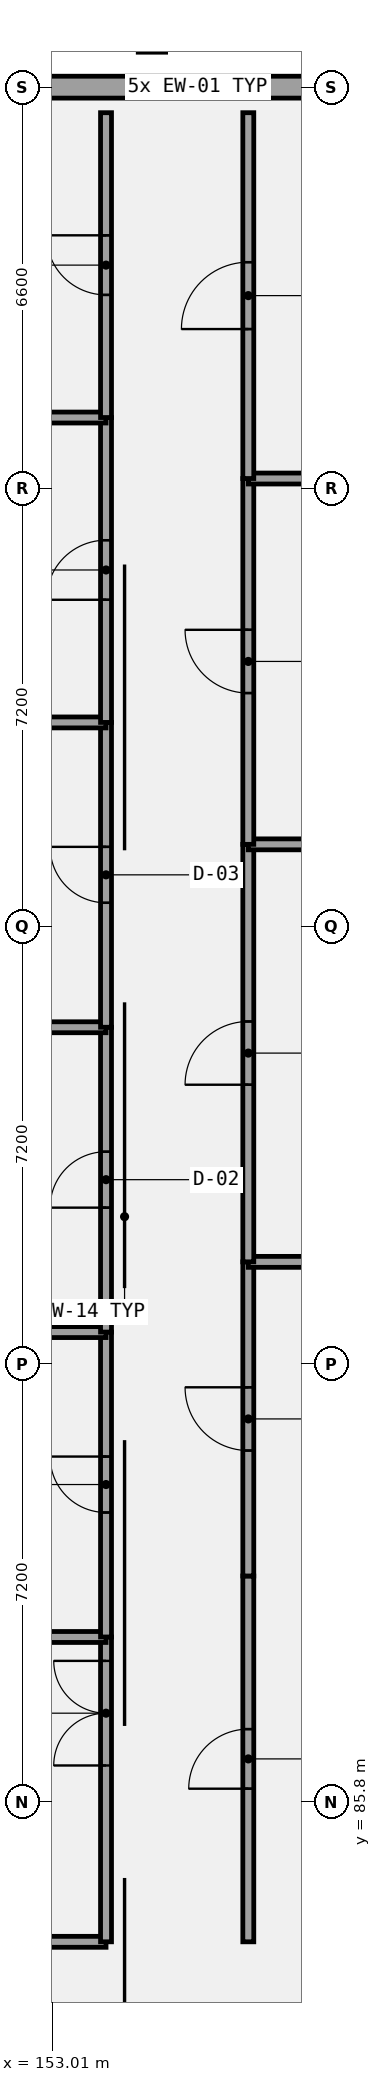
"""IFC4 building model, lengths in metres.
Left out: names, types, materials, properties, quantities, classifications, styles, units other than length and angle.
Written with IfcOpenShell. Run it as: python <this file> out.ifc"""

import sys

from ifc_helpers import new_model, si_unit, direction, frame, frame_2d, origin, origin_2d, place, context, subcontext, project, spatial, rectangle, extrude, element, fill, save


model = new_model("IFC4")
c1 = context("Model", 3, precision=1e-05, world=origin(), true_north=direction((0.0, 1.0)))
c2 = subcontext(c1, "Body", "Model", "MODEL_VIEW")
j1 = project(units=[si_unit("LENGTHUNIT", "METRE"), si_unit("PLANEANGLEUNIT", "RADIAN")], contexts=[c1])
p1 = place(None, origin())
s1 = spatial("IfcSite", under=j1, at=p1, CompositionType="ELEMENT")
p2 = place(p1, origin())
s2 = spatial("IfcBuilding", under=s1, at=p2, CompositionType="ELEMENT")
p3 = place(p2, origin())
s3 = spatial("IfcBuildingStorey", under=s2, at=p3, CompositionType="ELEMENT", Elevation=0.0)
p4 = place(p3, frame((154.65, 114.95, -0.32), z_axis=(0.0, 0.0, 1.0), x_axis=(1.0, 0.0, 0.0)))
e1 = element("IfcColumn", 1, at=p4, inside=s3, PredefinedType="PILASTER", context=c2, shape_type="SweptSolid", body=[
    extrude(rectangle(XDim=0.45, YDim=0.75, at=origin_2d()), origin(), (0.0, 0.0, 1.0), 5.72),
])
p5 = place(p3, frame((166.38, 114.0, 0.0), z_axis=(0.0, 0.0, 1.0), x_axis=(-1.0, 0.0, 0.0)))
e2 = element("IfcWall", 2, at=p5, inside=s3, PredefinedType="SOLIDWALL", context=c2, shape_type="SweptSolid", body=[
    extrude(rectangle(XDim=21.96, YDim=0.36, at=frame_2d((10.98, 0.0))), origin(), (0.0, 0.0, 1.0), 4.37),
])
p6 = place(p5, frame((17.755, 0.0, 0.95)))
e3 = element("IfcOpeningElement", 3, at=p6, cuts=e2, PredefinedType="OPENING", context=c2, shape_type="SweptSolid", body=[
    extrude(rectangle(XDim=0.85, YDim=1.4, at=frame_2d((0.425, 0.7))), frame((0.0, 0.19, 0.0), z_axis=(0.0, -1.0, 0.0), x_axis=(1.0, 0.0, 0.0)), (0.0, 0.0, 1.0), 0.38),
])
p7 = place(p3, frame((145.25, 83.5, 0.0), z_axis=(0.0, 0.0, 1.0), x_axis=(1.0, 0.0, 0.0)))
e4 = element("IfcWall", 4, at=p7, inside=s3, PredefinedType="PARTITIONING", context=c2, shape_type="SweptSolid", body=[
    extrude(rectangle(XDim=8.645, YDim=0.18, at=frame_2d((4.323, 0.0))), origin(), (0.0, 0.0, 1.0), 5.12),
])
p8 = place(p3, frame((153.895, 83.5, 0.0), z_axis=(0.0, 0.0, 1.0), x_axis=(0.0, 1.0, 0.0)))
e5 = element("IfcWall", 5, at=p8, inside=s3, PredefinedType="PARTITIONING", context=c2, shape_type="SweptSolid", body=[
    extrude(rectangle(XDim=5.013, YDim=0.18, at=frame_2d((2.506, 0.0))), origin(), (0.0, 0.0, 1.0), 5.12),
])
p9 = place(p8, frame((2.9, 0.0, 0.0)))
e6 = element("IfcOpeningElement", 6, at=p9, cuts=e5, PredefinedType="OPENING", context=c2, shape_type="SweptSolid", body=[
    extrude(rectangle(XDim=1.72, YDim=2.35, at=frame_2d((0.86, 1.175))), frame((0.0, 0.1, 0.0), z_axis=(0.0, -1.0, 0.0), x_axis=(1.0, 0.0, 0.0)), (0.0, 0.0, 1.0), 0.2),
])
p10 = place(p3, frame((145.25, 88.513, 0.0), z_axis=(0.0, 0.0, 1.0), x_axis=(1.0, 0.0, 0.0)))
e7 = element("IfcWall", 7, at=p10, inside=s3, PredefinedType="PARTITIONING", context=c2, shape_type="SweptSolid", body=[
    extrude(rectangle(XDim=8.645, YDim=0.18, at=frame_2d((4.323, 0.0))), origin(), (0.0, 0.0, 1.0), 5.12),
])
p11 = place(p3, frame((153.895, 88.513, 0.0), z_axis=(0.0, 0.0, 1.0), x_axis=(0.0, 1.0, 0.0)))
e8 = element("IfcWall", 8, at=p11, inside=s3, PredefinedType="PARTITIONING", context=c2, shape_type="SweptSolid", body=[
    extrude(rectangle(XDim=5.014, YDim=0.18, at=frame_2d((2.507, 0.0))), origin(), (0.0, 0.0, 1.0), 5.12),
])
p12 = place(p11, frame((2.047, 0.0, 0.0)))
e9 = element("IfcOpeningElement", 9, at=p12, cuts=e8, PredefinedType="OPENING", context=c2, shape_type="SweptSolid", body=[
    extrude(rectangle(XDim=0.92, YDim=2.1, at=frame_2d((0.46, 1.05))), frame((0.0, 0.1, 0.0), z_axis=(0.0, -1.0, 0.0), x_axis=(1.0, 0.0, 0.0)), (0.0, 0.0, 1.0), 0.2),
])
p13 = place(p3, frame((145.25, 93.527, 0.0), z_axis=(0.0, 0.0, 1.0), x_axis=(1.0, 0.0, 0.0)))
e10 = element("IfcWall", 10, at=p13, inside=s3, PredefinedType="PARTITIONING", context=c2, shape_type="SweptSolid", body=[
    extrude(rectangle(XDim=8.645, YDim=0.18, at=frame_2d((4.323, 0.0))), origin(), (0.0, 0.0, 1.0), 5.12),
])
p14 = place(p3, frame((153.895, 93.527, 0.0), z_axis=(0.0, 0.0, 1.0), x_axis=(0.0, 1.0, 0.0)))
e11 = element("IfcWall", 11, at=p14, inside=s3, PredefinedType="PARTITIONING", context=c2, shape_type="SweptSolid", body=[
    extrude(rectangle(XDim=5.013, YDim=0.18, at=frame_2d((2.506, 0.0))), origin(), (0.0, 0.0, 1.0), 5.12),
])
p15 = place(p14, frame((2.046, 0.0, 0.0)))
e12 = element("IfcOpeningElement", 12, at=p15, cuts=e11, PredefinedType="OPENING", context=c2, shape_type="SweptSolid", body=[
    extrude(rectangle(XDim=0.92, YDim=2.22, at=frame_2d((0.46, 1.11))), frame((0.0, 0.1, 0.0), z_axis=(0.0, -1.0, 0.0), x_axis=(1.0, 0.0, 0.0)), (0.0, 0.0, 1.0), 0.2),
])
p16 = place(p3, frame((145.25, 98.54, 0.0), z_axis=(0.0, 0.0, 1.0), x_axis=(1.0, 0.0, 0.0)))
e13 = element("IfcWall", 13, at=p16, inside=s3, PredefinedType="PARTITIONING", context=c2, shape_type="SweptSolid", body=[
    extrude(rectangle(XDim=8.645, YDim=0.18, at=frame_2d((4.323, 0.0))), origin(), (0.0, 0.0, 1.0), 4.57),
])
p17 = place(p3, frame((153.895, 98.54, 0.0), z_axis=(0.0, 0.0, 1.0), x_axis=(0.0, 1.0, 0.0)))
e14 = element("IfcWall", 14, at=p17, inside=s3, PredefinedType="PARTITIONING", context=c2, shape_type="SweptSolid", body=[
    extrude(rectangle(XDim=5.013, YDim=0.18, at=frame_2d((2.506, 0.0))), origin(), (0.0, 0.0, 1.0), 5.12),
])
p18 = place(p17, frame((2.046, 0.0, 0.0)))
e15 = element("IfcOpeningElement", 15, at=p18, cuts=e14, PredefinedType="OPENING", context=c2, shape_type="SweptSolid", body=[
    extrude(rectangle(XDim=0.92, YDim=2.35, at=frame_2d((0.46, 1.175))), frame((0.0, 0.1, 0.0), z_axis=(0.0, -1.0, 0.0), x_axis=(1.0, 0.0, 0.0)), (0.0, 0.0, 1.0), 0.2),
])
p19 = place(p3, frame((145.25, 103.553, 0.0), z_axis=(0.0, 0.0, 1.0), x_axis=(1.0, 0.0, 0.0)))
e16 = element("IfcWall", 16, at=p19, inside=s3, PredefinedType="PARTITIONING", context=c2, shape_type="SweptSolid", body=[
    extrude(rectangle(XDim=8.645, YDim=0.18, at=frame_2d((4.323, 0.0))), origin(), (0.0, 0.0, 1.0), 4.57),
])
p20 = place(p3, frame((153.895, 103.553, 0.0), z_axis=(0.0, 0.0, 1.0), x_axis=(0.0, 1.0, 0.0)))
e17 = element("IfcWall", 17, at=p20, inside=s3, PredefinedType="PARTITIONING", context=c2, shape_type="SweptSolid", body=[
    extrude(rectangle(XDim=5.014, YDim=0.18, at=frame_2d((2.507, 0.0))), origin(), (0.0, 0.0, 1.0), 5.12),
])
p21 = place(p20, frame((2.017, 0.0, 0.0)))
e18 = element("IfcOpeningElement", 18, at=p21, cuts=e17, PredefinedType="OPENING", context=c2, shape_type="SweptSolid", body=[
    extrude(rectangle(XDim=0.98, YDim=2.1, at=frame_2d((0.49, 1.05))), frame((0.0, 0.1, 0.0), z_axis=(0.0, -1.0, 0.0), x_axis=(1.0, 0.0, 0.0)), (0.0, 0.0, 1.0), 0.2),
])
p22 = place(p3, frame((145.25, 108.567, 0.0), z_axis=(0.0, 0.0, 1.0), x_axis=(1.0, 0.0, 0.0)))
e19 = element("IfcWall", 19, at=p22, inside=s3, PredefinedType="PARTITIONING", context=c2, shape_type="SweptSolid", body=[
    extrude(rectangle(XDim=8.645, YDim=0.18, at=frame_2d((4.323, 0.0))), origin(), (0.0, 0.0, 1.0), 5.12),
])
p23 = place(p3, frame((153.895, 108.567, 0.0), z_axis=(0.0, 0.0, 1.0), x_axis=(0.0, 1.0, 0.0)))
e20 = element("IfcWall", 20, at=p23, inside=s3, PredefinedType="PARTITIONING", context=c2, shape_type="SweptSolid", body=[
    extrude(rectangle(XDim=5.013, YDim=0.18, at=frame_2d((2.507, 0.0))), origin(), (0.0, 0.0, 1.0), 5.12),
])
p24 = place(p23, frame((2.017, 0.0, 0.0)))
e21 = element("IfcOpeningElement", 21, at=p24, cuts=e20, PredefinedType="OPENING", context=c2, shape_type="SweptSolid", body=[
    extrude(rectangle(XDim=0.98, YDim=2.22, at=frame_2d((0.49, 1.11))), frame((0.0, 0.1, 0.0), z_axis=(0.0, -1.0, 0.0), x_axis=(1.0, 0.0, 0.0)), (0.0, 0.0, 1.0), 0.2),
])
p25 = place(p3, frame((156.235, 83.5, 0.0), z_axis=(0.0, 0.0, 1.0), x_axis=(0.0, 1.0, 0.0)))
e22 = element("IfcWall", 22, at=p25, inside=s3, PredefinedType="PARTITIONING", context=c2, shape_type="SweptSolid", body=[
    extrude(rectangle(XDim=6.016, YDim=0.18, at=frame_2d((3.008, 0.0))), origin(), (0.0, 0.0, 1.0), 5.12),
])
p26 = place(p25, frame((2.518, 0.0, 0.0)))
e23 = element("IfcOpeningElement", 23, at=p26, cuts=e22, PredefinedType="OPENING", context=c2, shape_type="SweptSolid", body=[
    extrude(rectangle(XDim=0.98, YDim=2.35, at=frame_2d((0.49, 1.175))), frame((0.0, 0.1, 0.0), z_axis=(0.0, -1.0, 0.0), x_axis=(1.0, 0.0, 0.0)), (0.0, 0.0, 1.0), 0.2),
])
p27 = place(p3, frame((156.235, 89.516, 0.0), z_axis=(0.0, 0.0, 1.0), x_axis=(0.0, 1.0, 0.0)))
e24 = element("IfcWall", 24, at=p27, inside=s3, PredefinedType="PARTITIONING", context=c2, shape_type="SweptSolid", body=[
    extrude(rectangle(XDim=5.166, YDim=0.18, at=frame_2d((2.583, 0.0))), origin(), (0.0, 0.0, 1.0), 5.12),
])
p28 = place(p27, frame((2.063, 0.0, 0.0)))
e25 = element("IfcOpeningElement", 25, at=p28, cuts=e24, PredefinedType="OPENING", context=c2, shape_type="SweptSolid", body=[
    extrude(rectangle(XDim=1.04, YDim=2.1, at=frame_2d((0.52, 1.05))), frame((0.0, 0.1, 0.0), z_axis=(0.0, -1.0, 0.0), x_axis=(1.0, 0.0, 0.0)), (0.0, 0.0, 1.0), 0.2),
])
p29 = place(p3, frame((156.235, 94.682, 0.0), z_axis=(0.0, 0.0, 1.0), x_axis=(1.0, 0.0, 0.0)))
e26 = element("IfcWall", 26, at=p29, inside=s3, PredefinedType="PARTITIONING", context=c2, shape_type="SweptSolid", body=[
    extrude(rectangle(XDim=9.785, YDim=0.18, at=frame_2d((4.893, 0.0))), origin(), (0.0, 0.0, 1.0), 4.57),
])
p30 = place(p3, frame((156.235, 94.682, 0.0), z_axis=(0.0, 0.0, 1.0), x_axis=(0.0, 1.0, 0.0)))
e27 = element("IfcWall", 27, at=p30, inside=s3, PredefinedType="PARTITIONING", context=c2, shape_type="SweptSolid", body=[
    extrude(rectangle(XDim=6.866, YDim=0.18, at=frame_2d((3.433, 0.0))), origin(), (0.0, 0.0, 1.0), 5.12),
])
p31 = place(p30, frame((2.913, 0.0, 0.0)))
e28 = element("IfcOpeningElement", 28, at=p31, cuts=e27, PredefinedType="OPENING", context=c2, shape_type="SweptSolid", body=[
    extrude(rectangle(XDim=1.04, YDim=2.22, at=frame_2d((0.52, 1.11))), frame((0.0, 0.1, 0.0), z_axis=(0.0, -1.0, 0.0), x_axis=(1.0, 0.0, 0.0)), (0.0, 0.0, 1.0), 0.2),
])
p32 = place(p3, frame((156.235, 101.548, 0.0), z_axis=(0.0, 0.0, 1.0), x_axis=(1.0, 0.0, 0.0)))
e29 = element("IfcWall", 29, at=p32, inside=s3, PredefinedType="PARTITIONING", context=c2, shape_type="SweptSolid", body=[
    extrude(rectangle(XDim=9.785, YDim=0.18, at=frame_2d((4.893, 0.0))), origin(), (0.0, 0.0, 1.0), 5.12),
])
p33 = place(p3, frame((156.235, 101.548, 0.0), z_axis=(0.0, 0.0, 1.0), x_axis=(0.0, 1.0, 0.0)))
e30 = element("IfcWall", 30, at=p33, inside=s3, PredefinedType="PARTITIONING", context=c2, shape_type="SweptSolid", body=[
    extrude(rectangle(XDim=6.016, YDim=0.18, at=frame_2d((3.008, 0.0))), origin(), (0.0, 0.0, 1.0), 5.12),
])
p34 = place(p33, frame((2.488, 0.0, 0.0)))
e31 = element("IfcOpeningElement", 31, at=p34, cuts=e30, PredefinedType="OPENING", context=c2, shape_type="SweptSolid", body=[
    extrude(rectangle(XDim=1.04, YDim=2.35, at=frame_2d((0.52, 1.175))), frame((0.0, 0.1, 0.0), z_axis=(0.0, -1.0, 0.0), x_axis=(1.0, 0.0, 0.0)), (0.0, 0.0, 1.0), 0.2),
])
p35 = place(p3, frame((156.235, 107.564, 0.0), z_axis=(0.0, 0.0, 1.0), x_axis=(1.0, 0.0, 0.0)))
e32 = element("IfcWall", 32, at=p35, inside=s3, PredefinedType="PARTITIONING", context=c2, shape_type="SweptSolid", body=[
    extrude(rectangle(XDim=9.785, YDim=0.18, at=frame_2d((4.893, 0.0))), origin(), (0.0, 0.0, 1.0), 4.37),
])
p36 = place(p3, frame((156.235, 107.564, 0.0), z_axis=(0.0, 0.0, 1.0), x_axis=(0.0, 1.0, 0.0)))
e33 = element("IfcWall", 33, at=p36, inside=s3, PredefinedType="PARTITIONING", context=c2, shape_type="SweptSolid", body=[
    extrude(rectangle(XDim=6.016, YDim=0.18, at=frame_2d((3.008, 0.0))), origin(), (0.0, 0.0, 1.0), 5.12),
])
p37 = place(p36, frame((2.458, 0.0, 0.0)))
e34 = element("IfcOpeningElement", 34, at=p37, cuts=e33, PredefinedType="OPENING", context=c2, shape_type="SweptSolid", body=[
    extrude(rectangle(XDim=1.1, YDim=2.1, at=frame_2d((0.55, 1.05))), frame((0.0, 0.1, 0.0), z_axis=(0.0, -1.0, 0.0), x_axis=(1.0, 0.0, 0.0)), (0.0, 0.0, 1.0), 0.2),
])
p38 = place(p9, frame((1.72, 0.0, 0.0), z_axis=(0.0, 0.0, 1.0), x_axis=(-1.0, 0.0, 0.0)))
e35 = element("IfcDoor", 35, at=p38, inside=s3, OperationType="DOUBLE_DOOR_SINGLE_SWING", PredefinedType="DOOR", context=c2, shape_type="SweptSolid", body=[
    extrude(rectangle(XDim=1.72, YDim=2.35, at=frame_2d((0.86, 1.175))), frame((0.0, 0.025, 0.0), z_axis=(0.0, -1.0, 0.0), x_axis=(1.0, 0.0, 0.0)), (0.0, 0.0, 1.0), 0.05),
])
fill(e6, e35)
p39 = place(p12, frame((0.92, 0.0, 0.0), z_axis=(0.0, 0.0, 1.0), x_axis=(-1.0, 0.0, 0.0)))
e36 = element("IfcDoor", 36, at=p39, inside=s3, OperationType="SINGLE_SWING_RIGHT", PredefinedType="DOOR", context=c2, shape_type="SweptSolid", body=[
    extrude(rectangle(XDim=0.92, YDim=2.1, at=frame_2d((0.46, 1.05))), frame((0.0, 0.025, 0.0), z_axis=(0.0, -1.0, 0.0), x_axis=(1.0, 0.0, 0.0)), (0.0, 0.0, 1.0), 0.05),
])
fill(e9, e36)
p40 = place(p15, frame((0.92, 0.0, 0.0), z_axis=(0.0, 0.0, 1.0), x_axis=(-1.0, 0.0, 0.0)))
e37 = element("IfcDoor", 37, at=p40, inside=s3, OperationType="SINGLE_SWING_LEFT", PredefinedType="DOOR", context=c2, shape_type="SweptSolid", body=[
    extrude(rectangle(XDim=0.92, YDim=2.22, at=frame_2d((0.46, 1.11))), frame((0.0, 0.025, 0.0), z_axis=(0.0, -1.0, 0.0), x_axis=(1.0, 0.0, 0.0)), (0.0, 0.0, 1.0), 0.05),
])
fill(e12, e37)
p41 = place(p18, frame((0.92, 0.0, 0.0), z_axis=(0.0, 0.0, 1.0), x_axis=(-1.0, 0.0, 0.0)))
e38 = element("IfcDoor", 38, at=p41, inside=s3, OperationType="SINGLE_SWING_RIGHT", PredefinedType="DOOR", context=c2, shape_type="SweptSolid", body=[
    extrude(rectangle(XDim=0.92, YDim=2.35, at=frame_2d((0.46, 1.175))), frame((0.0, 0.025, 0.0), z_axis=(0.0, -1.0, 0.0), x_axis=(1.0, 0.0, 0.0)), (0.0, 0.0, 1.0), 0.05),
])
fill(e15, e38)
p42 = place(p21, frame((0.98, 0.0, 0.0), z_axis=(0.0, 0.0, 1.0), x_axis=(-1.0, 0.0, 0.0)))
e39 = element("IfcDoor", 39, at=p42, inside=s3, OperationType="SINGLE_SWING_LEFT", PredefinedType="DOOR", context=c2, shape_type="SweptSolid", body=[
    extrude(rectangle(XDim=0.98, YDim=2.1, at=frame_2d((0.49, 1.05))), frame((0.0, 0.025, 0.0), z_axis=(0.0, -1.0, 0.0), x_axis=(1.0, 0.0, 0.0)), (0.0, 0.0, 1.0), 0.05),
])
fill(e18, e39)
p43 = place(p24, frame((0.98, 0.0, 0.0), z_axis=(0.0, 0.0, 1.0), x_axis=(-1.0, 0.0, 0.0)))
e40 = element("IfcDoor", 40, at=p43, inside=s3, OperationType="SINGLE_SWING_RIGHT", PredefinedType="DOOR", context=c2, shape_type="SweptSolid", body=[
    extrude(rectangle(XDim=0.98, YDim=2.22, at=frame_2d((0.49, 1.11))), frame((0.0, 0.025, 0.0), z_axis=(0.0, -1.0, 0.0), x_axis=(1.0, 0.0, 0.0)), (0.0, 0.0, 1.0), 0.05),
])
fill(e21, e40)
p44 = place(p26, origin())
e41 = element("IfcDoor", 41, at=p44, inside=s3, OperationType="SINGLE_SWING_LEFT", PredefinedType="DOOR", context=c2, shape_type="SweptSolid", body=[
    extrude(rectangle(XDim=0.98, YDim=2.35, at=frame_2d((0.49, 1.175))), frame((0.0, 0.025, 0.0), z_axis=(0.0, -1.0, 0.0), x_axis=(1.0, 0.0, 0.0)), (0.0, 0.0, 1.0), 0.05),
])
fill(e23, e41)
p45 = place(p28, origin())
e42 = element("IfcDoor", 42, at=p45, inside=s3, OperationType="SINGLE_SWING_RIGHT", PredefinedType="DOOR", context=c2, shape_type="SweptSolid", body=[
    extrude(rectangle(XDim=1.04, YDim=2.1, at=frame_2d((0.52, 1.05))), frame((0.0, 0.025, 0.0), z_axis=(0.0, -1.0, 0.0), x_axis=(1.0, 0.0, 0.0)), (0.0, 0.0, 1.0), 0.05),
])
fill(e25, e42)
p46 = place(p31, origin())
e43 = element("IfcDoor", 43, at=p46, inside=s3, OperationType="SINGLE_SWING_LEFT", PredefinedType="DOOR", context=c2, shape_type="SweptSolid", body=[
    extrude(rectangle(XDim=1.04, YDim=2.22, at=frame_2d((0.52, 1.11))), frame((0.0, 0.025, 0.0), z_axis=(0.0, -1.0, 0.0), x_axis=(1.0, 0.0, 0.0)), (0.0, 0.0, 1.0), 0.05),
])
fill(e28, e43)
p47 = place(p34, origin())
e44 = element("IfcDoor", 44, at=p47, inside=s3, OperationType="SINGLE_SWING_RIGHT", PredefinedType="DOOR", context=c2, shape_type="SweptSolid", body=[
    extrude(rectangle(XDim=1.04, YDim=2.35, at=frame_2d((0.52, 1.175))), frame((0.0, 0.025, 0.0), z_axis=(0.0, -1.0, 0.0), x_axis=(1.0, 0.0, 0.0)), (0.0, 0.0, 1.0), 0.05),
])
fill(e31, e44)
p48 = place(p37, origin())
e45 = element("IfcDoor", 45, at=p48, inside=s3, OperationType="SINGLE_SWING_LEFT", PredefinedType="DOOR", context=c2, shape_type="SweptSolid", body=[
    extrude(rectangle(XDim=1.1, YDim=2.1, at=frame_2d((0.55, 1.05))), frame((0.0, 0.025, 0.0), z_axis=(0.0, -1.0, 0.0), x_axis=(1.0, 0.0, 0.0)), (0.0, 0.0, 1.0), 0.05),
])
fill(e34, e45)
save(model, sys.argv[1])
